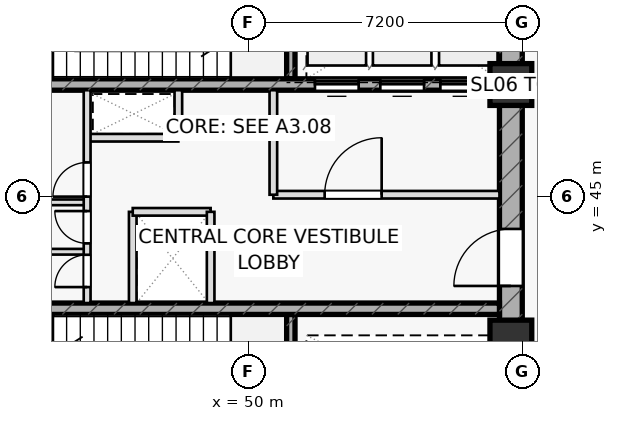
"""IFC4 building model, lengths in metres.
Left out: names, types, materials, properties, quantities, classifications, styles, units other than length and angle.
Written with IfcOpenShell. Run it as: python <this file> out.ifc"""

import sys

from ifc_helpers import new_model, si_unit, direction, frame, frame_2d, origin, origin_2d, place, context, subcontext, project, spatial, rectangle, extrude, element, fill, save


model = new_model("IFC4")
c1 = context("Model", 3, precision=1e-05, world=origin(), true_north=direction((0.0, 1.0)))
c2 = subcontext(c1, "Body", "Model", "MODEL_VIEW")
j1 = project(units=[si_unit("LENGTHUNIT", "METRE"), si_unit("PLANEANGLEUNIT", "RADIAN")], contexts=[c1])
p1 = place(None, origin())
s1 = spatial("IfcSite", under=j1, at=p1, CompositionType="ELEMENT")
p2 = place(p1, origin())
s2 = spatial("IfcBuilding", under=s1, at=p2, CompositionType="ELEMENT")
p3 = place(p2, frame((0.0, 0.0, 97.8)))
s3 = spatial("IfcBuildingStorey", under=s2, at=p3, CompositionType="ELEMENT", Elevation=97.8)
for number, where, z_axis, x_axis in (
    (1, (51.11, 48.1, 0.0), (0.0, 0.0, 1.0), (0.0, 1.0, 0.0)),
    (2, (51.11, 38.8, 0.0), (0.0, 0.0, 1.0), (0.0, 1.0, 0.0)),
):
    element("IfcWall", number, at=place(p3, frame(where, z_axis=z_axis, x_axis=x_axis)), inside=s3, PredefinedType="SHEAR", context=c2, shape_type="SweptSolid", body=[
        extrude(rectangle(XDim=3.1, YDim=0.22, at=frame_2d((1.55, 0.0))), origin(), (0.0, 0.0, 1.0), 4.55),
    ])
p4 = place(p3, frame((56.9, 38.8, 0.0), z_axis=(0.0, 0.0, 1.0), x_axis=(0.0, 1.0, 0.0)))
e3 = element("IfcWall", 3, at=p4, inside=s3, PredefinedType="SHEAR", context=c2, shape_type="SweptSolid", body=[
    extrude(rectangle(XDim=12.4, YDim=0.6, at=frame_2d((6.2, 0.0))), origin(), (0.0, 0.0, 1.0), 4.55),
])
p5 = place(p4, frame((3.85, 0.0, 0.0)))
e4 = element("IfcOpeningElement", 4, at=p5, cuts=e3, PredefinedType="OPENING", context=c2, shape_type="SweptSolid", body=[
    extrude(rectangle(XDim=1.5, YDim=2.2, at=frame_2d((0.75, 1.1))), frame((0.0, 0.31, 0.0), z_axis=(0.0, -1.0, 0.0), x_axis=(1.0, 0.0, 0.0)), (0.0, 0.0, 1.0), 0.62),
])
p6 = place(p3, frame((43.4, 47.95, 0.0), z_axis=(0.0, 0.0, 1.0), x_axis=(1.0, 0.0, 0.0)))
e5 = element("IfcWall", 5, at=p6, inside=s3, PredefinedType="SHEAR", context=c2, shape_type="SweptSolid", body=[
    extrude(rectangle(XDim=13.2, YDim=0.3, at=frame_2d((6.6, 0.0))), origin(), (0.0, 0.0, 1.0), 4.55),
])
p7 = place(p6, frame((8.345, 0.0, 0.0)))
e6 = element("IfcOpeningElement", 6, at=p7, cuts=e5, PredefinedType="OPENING", context=c2, shape_type="SweptSolid", body=[
    extrude(rectangle(XDim=1.15, YDim=2.2, at=frame_2d((0.575, 1.1))), frame((0.0, 0.16, 0.0), z_axis=(0.0, -1.0, 0.0), x_axis=(1.0, 0.0, 0.0)), (0.0, 0.0, 1.0), 0.32),
])
p8 = place(p6, frame((10.065, 0.0, 0.0)))
e7 = element("IfcOpeningElement", 7, at=p8, cuts=e5, PredefinedType="OPENING", context=c2, shape_type="SweptSolid", body=[
    extrude(rectangle(XDim=1.15, YDim=2.2, at=frame_2d((0.575, 1.1))), frame((0.0, 0.16, 0.0), z_axis=(0.0, -1.0, 0.0), x_axis=(1.0, 0.0, 0.0)), (0.0, 0.0, 1.0), 0.32),
])
p9 = place(p6, frame((11.645, 0.0, 0.0)))
e8 = element("IfcOpeningElement", 8, at=p9, cuts=e5, PredefinedType="OPENING", context=c2, shape_type="SweptSolid", body=[
    extrude(rectangle(XDim=1.15, YDim=2.2, at=frame_2d((0.575, 1.1))), frame((0.0, 0.16, 0.0), z_axis=(0.0, -1.0, 0.0), x_axis=(1.0, 0.0, 0.0)), (0.0, 0.0, 1.0), 0.32),
])
p10 = place(p3, frame((43.4, 42.05, 0.0), z_axis=(0.0, 0.0, 1.0), x_axis=(1.0, 0.0, 0.0)))
e9 = element("IfcWall", 9, at=p10, inside=s3, PredefinedType="SHEAR", context=c2, shape_type="SweptSolid", body=[
    extrude(rectangle(XDim=13.2, YDim=0.3, at=frame_2d((6.6, 0.0))), origin(), (0.0, 0.0, 1.0), 4.55),
])
for number, where, z_axis, x_axis in (
    (10, (56.9, 47.95, 0.0), (0.0, 0.0, 1.0), (1.0, 0.0, 0.0)),
    (11, (56.9, 41.2, 0.0), (0.0, 0.0, 1.0), (1.0, 0.0, 0.0)),
):
    element("IfcColumn", number, at=place(p3, frame(where, z_axis=z_axis, x_axis=x_axis)), inside=s3, PredefinedType="COLUMN", context=c2, shape_type="SweptSolid", body=[
        extrude(rectangle(XDim=1.1, YDim=1.1, at=origin_2d()), origin(), (0.0, 0.0, 1.0), 4.55),
    ])
p11 = place(p3, frame((45.75, 46.55, 0.0), z_axis=(0.0, 0.0, 1.0), x_axis=(1.0, 0.0, 0.0)))
e12 = element("IfcWall", 12, at=p11, inside=s3, PredefinedType="PARTITIONING", context=c2, shape_type="SweptSolid", body=[
    extrude(rectangle(XDim=2.4, YDim=0.2, at=frame_2d((1.2, 0.0))), origin(), (0.0, 0.0, 1.0), 4.55),
])
p12 = place(p3, frame((48.15, 46.55, 0.0), z_axis=(0.0, 0.0, 1.0), x_axis=(0.0, 1.0, 0.0)))
e13 = element("IfcWall", 13, at=p12, inside=s3, PredefinedType="PARTITIONING", context=c2, shape_type="SweptSolid", body=[
    extrude(rectangle(XDim=1.25, YDim=0.2, at=frame_2d((0.625, 0.0))), origin(), (0.0, 0.0, 1.0), 4.55),
])
p13 = place(p3, frame((46.95, 42.2, 0.0), z_axis=(0.0, 0.0, 1.0), x_axis=(0.0, 1.0, 0.0)))
e14 = element("IfcWall", 14, at=p13, inside=s3, PredefinedType="PARTITIONING", context=c2, shape_type="SweptSolid", body=[
    extrude(rectangle(XDim=2.4, YDim=0.2, at=frame_2d((1.2, 0.0))), origin(), (0.0, 0.0, 1.0), 4.55),
])
p14 = place(p3, frame((46.95, 44.6, 0.0), z_axis=(0.0, 0.0, 1.0), x_axis=(1.0, 0.0, 0.0)))
e15 = element("IfcWall", 15, at=p14, inside=s3, PredefinedType="PARTITIONING", context=c2, shape_type="SweptSolid", body=[
    extrude(rectangle(XDim=2.05, YDim=0.2, at=frame_2d((1.025, 0.0))), origin(), (0.0, 0.0, 1.0), 4.55),
])
p15 = place(p3, frame((50.65, 45.05, 0.0), z_axis=(0.0, 0.0, 1.0), x_axis=(1.0, 0.0, 0.0)))
e16 = element("IfcWall", 16, at=p15, inside=s3, PredefinedType="PARTITIONING", context=c2, shape_type="SweptSolid", body=[
    extrude(rectangle(XDim=5.95, YDim=0.2, at=frame_2d((2.975, 0.0))), origin(), (0.0, 0.0, 1.0), 4.55),
])
p16 = place(p15, frame((1.35, 0.0, 0.0)))
e17 = element("IfcOpeningElement", 17, at=p16, cuts=e16, PredefinedType="OPENING", context=c2, shape_type="SweptSolid", body=[
    extrude(rectangle(XDim=1.5, YDim=2.2, at=frame_2d((0.75, 1.1))), frame((0.0, 0.11, 0.0), z_axis=(0.0, -1.0, 0.0), x_axis=(1.0, 0.0, 0.0)), (0.0, 0.0, 1.0), 0.22),
])
p17 = place(p3, frame((50.65, 45.05, 0.0), z_axis=(0.0, 0.0, 1.0), x_axis=(0.0, 1.0, 0.0)))
e18 = element("IfcWall", 18, at=p17, inside=s3, PredefinedType="PARTITIONING", context=c2, shape_type="SweptSolid", body=[
    extrude(rectangle(XDim=2.75, YDim=0.2, at=frame_2d((1.375, 0.0))), origin(), (0.0, 0.0, 1.0), 4.55),
])
for number, where, z_axis, x_axis in (
    (19, (43.4, 43.55, 0.0), (0.0, 0.0, 1.0), (1.0, 0.0, 0.0)),
    (20, (43.4, 44.85, 0.0), (0.0, 0.0, 1.0), (1.0, 0.0, 0.0)),
):
    element("IfcWall", number, at=place(p3, frame(where, z_axis=z_axis, x_axis=x_axis)), inside=s3, PredefinedType="PARTITIONING", context=c2, shape_type="SweptSolid", body=[
        extrude(rectangle(XDim=2.35, YDim=0.15, at=frame_2d((1.175, 0.0))), origin(), (0.0, 0.0, 1.0), 4.55),
    ])
p18 = place(p3, frame((45.75, 42.2, 0.0), z_axis=(0.0, 0.0, 1.0), x_axis=(0.0, 1.0, 0.0)))
e21 = element("IfcWall", 21, at=p18, inside=s3, PredefinedType="PARTITIONING", context=c2, shape_type="SweptSolid", body=[
    extrude(rectangle(XDim=5.6, YDim=0.18, at=frame_2d((2.8, 0.0))), origin(), (0.0, 0.0, 1.0), 4.55),
])
p19 = place(p18, frame((0.42, 0.0, 0.0)))
e22 = element("IfcOpeningElement", 22, at=p19, cuts=e21, PredefinedType="OPENING", context=c2, shape_type="SweptSolid", body=[
    extrude(rectangle(XDim=0.85, YDim=2.05, at=frame_2d((0.425, 1.025))), frame((0.0, 0.1, 0.0), z_axis=(0.0, -1.0, 0.0), x_axis=(1.0, 0.0, 0.0)), (0.0, 0.0, 1.0), 0.2),
])
p20 = place(p18, frame((1.57, 0.0, 0.0)))
e23 = element("IfcOpeningElement", 23, at=p20, cuts=e21, PredefinedType="OPENING", context=c2, shape_type="SweptSolid", body=[
    extrude(rectangle(XDim=0.85, YDim=2.05, at=frame_2d((0.425, 1.025))), frame((0.0, 0.1, 0.0), z_axis=(0.0, -1.0, 0.0), x_axis=(1.0, 0.0, 0.0)), (0.0, 0.0, 1.0), 0.2),
])
p21 = place(p18, frame((2.8, 0.0, 0.0)))
e24 = element("IfcOpeningElement", 24, at=p21, cuts=e21, PredefinedType="OPENING", context=c2, shape_type="SweptSolid", body=[
    extrude(rectangle(XDim=0.9, YDim=2.05, at=frame_2d((0.45, 1.025))), frame((0.0, 0.1, 0.0), z_axis=(0.0, -1.0, 0.0), x_axis=(1.0, 0.0, 0.0)), (0.0, 0.0, 1.0), 0.2),
])
p22 = place(p3, frame((49.0, 42.2, 0.0), z_axis=(0.0, 0.0, 1.0), x_axis=(0.0, 1.0, 0.0)))
e25 = element("IfcWall", 25, at=p22, inside=s3, PredefinedType="PARTITIONING", context=c2, shape_type="SweptSolid", body=[
    extrude(rectangle(XDim=2.4, YDim=0.2, at=frame_2d((1.2, 0.0))), origin(), (0.0, 0.0, 1.0), 4.55),
])
p23 = place(p5, origin())
e26 = element("IfcDoor", 26, at=p23, inside=s3, OperationType="SINGLE_SWING_LEFT", PredefinedType="DOOR", context=c2, shape_type="SweptSolid", body=[
    extrude(rectangle(XDim=1.5, YDim=2.2, at=frame_2d((0.75, 1.1))), frame((0.0, 0.025, 0.0), z_axis=(0.0, -1.0, 0.0), x_axis=(1.0, 0.0, 0.0)), (0.0, 0.0, 1.0), 0.05),
])
fill(e4, e26)
p24 = place(p16, origin())
e27 = element("IfcDoor", 27, at=p24, inside=s3, OperationType="SINGLE_SWING_RIGHT", PredefinedType="DOOR", context=c2, shape_type="SweptSolid", body=[
    extrude(rectangle(XDim=1.5, YDim=2.2, at=frame_2d((0.75, 1.1))), frame((0.0, 0.025, 0.0), z_axis=(0.0, -1.0, 0.0), x_axis=(1.0, 0.0, 0.0)), (0.0, 0.0, 1.0), 0.05),
])
fill(e17, e27)
p25 = place(p19, origin())
e28 = element("IfcDoor", 28, at=p25, inside=s3, OperationType="SINGLE_SWING_LEFT", PredefinedType="DOOR", context=c2, shape_type="SweptSolid", body=[
    extrude(rectangle(XDim=0.85, YDim=2.05, at=frame_2d((0.425, 1.025))), frame((0.0, 0.025, 0.0), z_axis=(0.0, -1.0, 0.0), x_axis=(1.0, 0.0, 0.0)), (0.0, 0.0, 1.0), 0.05),
])
fill(e22, e28)
p26 = place(p20, origin())
e29 = element("IfcDoor", 29, at=p26, inside=s3, OperationType="SINGLE_SWING_RIGHT", PredefinedType="DOOR", context=c2, shape_type="SweptSolid", body=[
    extrude(rectangle(XDim=0.85, YDim=2.05, at=frame_2d((0.425, 1.025))), frame((0.0, 0.025, 0.0), z_axis=(0.0, -1.0, 0.0), x_axis=(1.0, 0.0, 0.0)), (0.0, 0.0, 1.0), 0.05),
])
fill(e23, e29)
p27 = place(p21, origin())
e30 = element("IfcDoor", 30, at=p27, inside=s3, OperationType="SINGLE_SWING_LEFT", PredefinedType="DOOR", context=c2, shape_type="SweptSolid", body=[
    extrude(rectangle(XDim=0.9, YDim=2.05, at=frame_2d((0.45, 1.025))), frame((0.0, 0.025, 0.0), z_axis=(0.0, -1.0, 0.0), x_axis=(1.0, 0.0, 0.0)), (0.0, 0.0, 1.0), 0.05),
])
fill(e24, e30)
p28 = place(p7, origin())
e31 = element("IfcDoor", 31, at=p28, inside=s3, OperationType="SLIDING_TO_LEFT", PredefinedType="DOOR", context=c2, shape_type="SweptSolid", body=[
    extrude(rectangle(XDim=1.15, YDim=2.2, at=frame_2d((0.575, 1.1))), frame((0.0, 0.025, 0.0), z_axis=(0.0, -1.0, 0.0), x_axis=(1.0, 0.0, 0.0)), (0.0, 0.0, 1.0), 0.05),
])
fill(e6, e31)
p29 = place(p8, origin())
e32 = element("IfcDoor", 32, at=p29, inside=s3, OperationType="SLIDING_TO_LEFT", PredefinedType="DOOR", context=c2, shape_type="SweptSolid", body=[
    extrude(rectangle(XDim=1.15, YDim=2.2, at=frame_2d((0.575, 1.1))), frame((0.0, 0.025, 0.0), z_axis=(0.0, -1.0, 0.0), x_axis=(1.0, 0.0, 0.0)), (0.0, 0.0, 1.0), 0.05),
])
fill(e7, e32)
p30 = place(p9, origin())
e33 = element("IfcDoor", 33, at=p30, inside=s3, OperationType="SLIDING_TO_LEFT", PredefinedType="DOOR", context=c2, shape_type="SweptSolid", body=[
    extrude(rectangle(XDim=1.15, YDim=2.2, at=frame_2d((0.575, 1.1))), frame((0.0, 0.025, 0.0), z_axis=(0.0, -1.0, 0.0), x_axis=(1.0, 0.0, 0.0)), (0.0, 0.0, 1.0), 0.05),
])
fill(e8, e33)
save(model, sys.argv[1])
